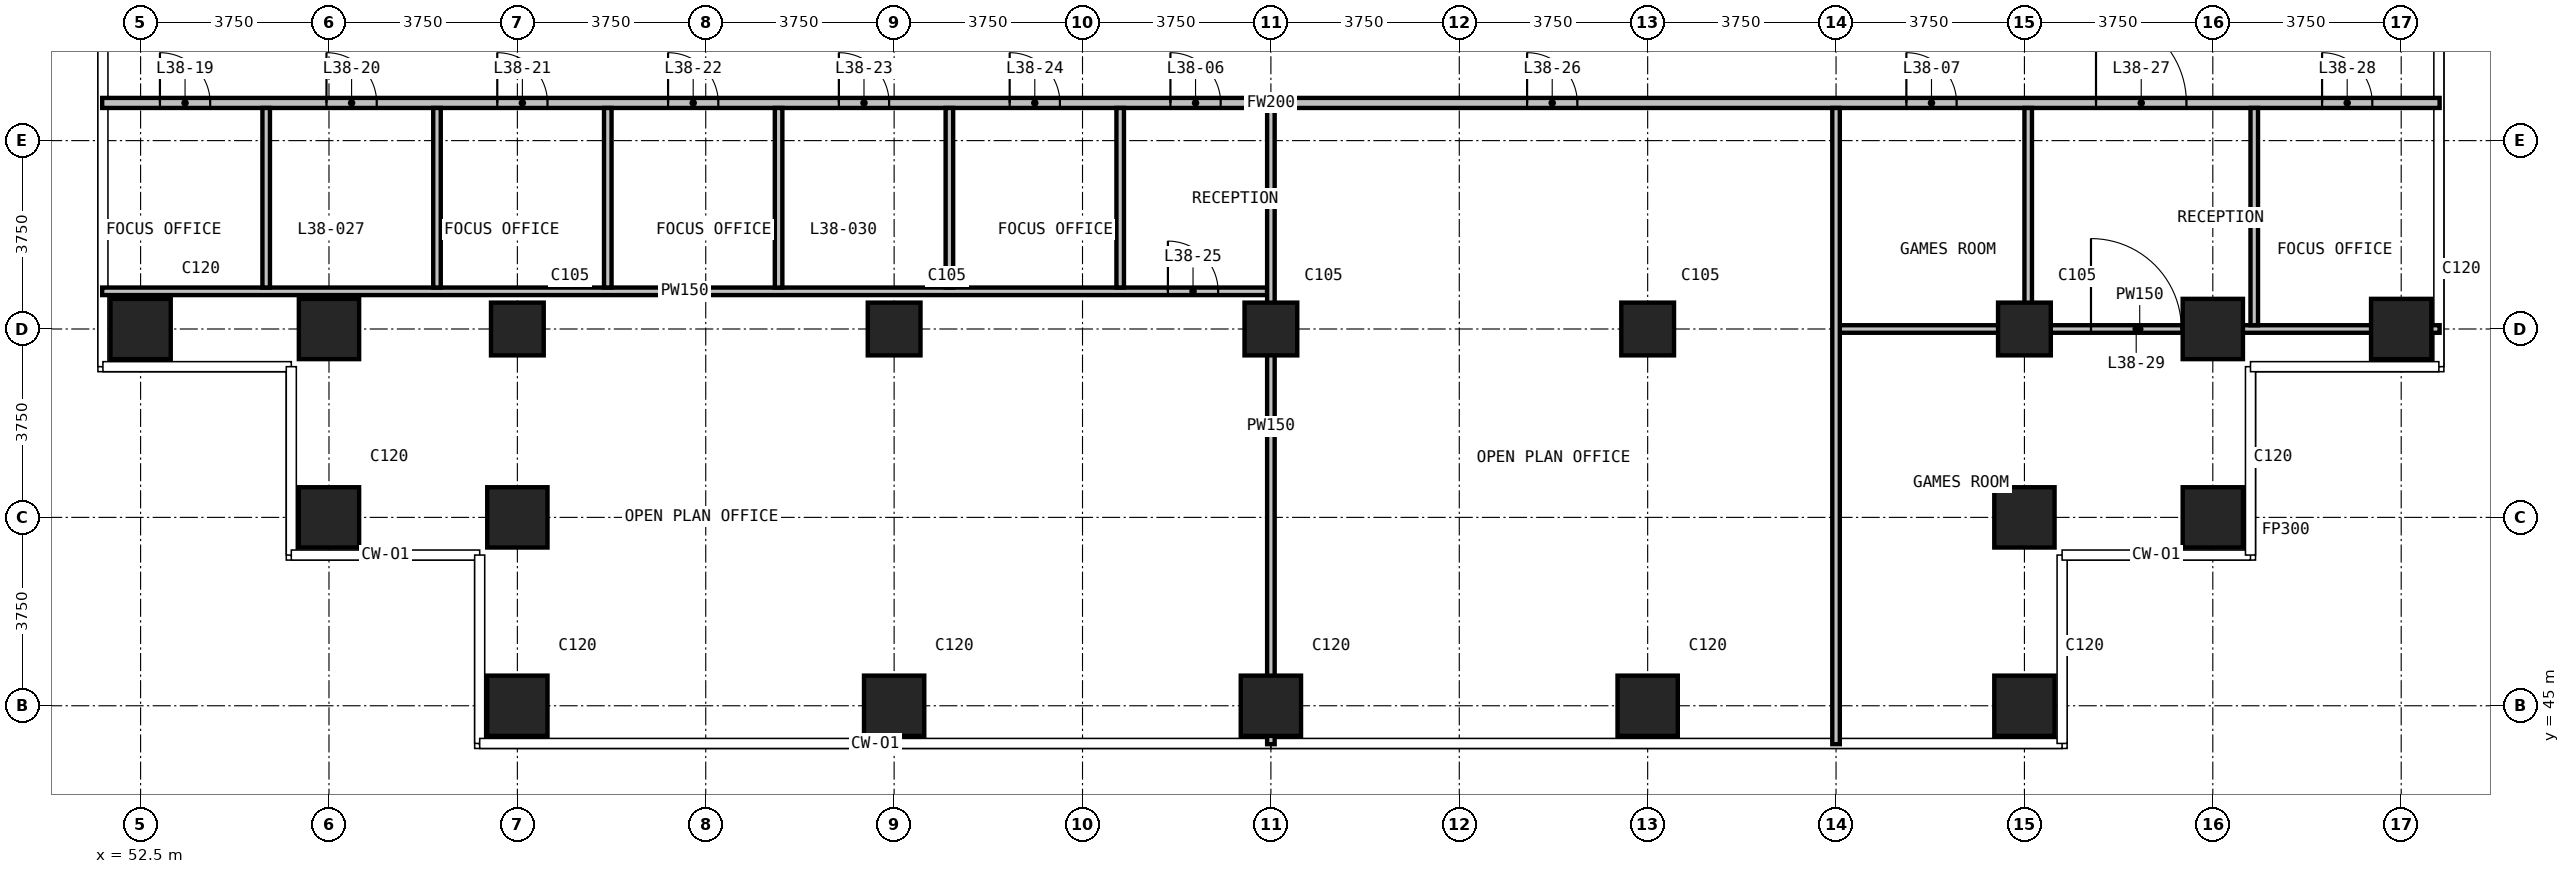
"""IFC4 building model, lengths in metres.
Left out: names, types, materials, properties, quantities, classifications, styles, units other than length and angle.
Written with IfcOpenShell. Run it as: python <this file> out.ifc"""

import sys

from ifc_helpers import new_model, si_unit, direction, frame, frame_2d, origin, origin_2d, place, context, subcontext, project, spatial, rectangle, extrude, element, fill, save


model = new_model("IFC4")
c1 = context("Model", 3, precision=1e-05, world=origin(), true_north=direction((0.0, 1.0)))
c2 = subcontext(c1, "Body", "Model", "MODEL_VIEW")
j1 = project(units=[si_unit("LENGTHUNIT", "METRE"), si_unit("PLANEANGLEUNIT", "RADIAN")], contexts=[c1])
p1 = place(None, origin())
s1 = spatial("IfcSite", under=j1, at=p1, CompositionType="ELEMENT")
p2 = place(p1, origin())
s2 = spatial("IfcBuilding", under=s1, at=p2, CompositionType="ELEMENT")
p3 = place(p2, frame((0.0, 0.0, 151.3)))
s3 = spatial("IfcBuildingStorey", under=s2, at=p3, CompositionType="ELEMENT", Elevation=151.3)
for number, where, z_axis, x_axis in (
    (1, (52.5, 52.5, 0.0), (0.0, 0.0, 1.0), (1.0, 0.0, 0.0)),
    (2, (56.25, 48.75, 0.0), (0.0, 0.0, 1.0), (1.0, 0.0, 0.0)),
    (3, (56.25, 52.5, 0.0), (0.0, 0.0, 1.0), (1.0, 0.0, 0.0)),
    (4, (60.0, 45.0, 0.0), (0.0, 0.0, 1.0), (1.0, 0.0, 0.0)),
    (5, (60.0, 48.75, 0.0), (0.0, 0.0, 1.0), (1.0, 0.0, 0.0)),
):
    element("IfcColumn", number, at=place(p3, frame(where, z_axis=z_axis, x_axis=x_axis)), inside=s3, PredefinedType="COLUMN", context=c2, shape_type="SweptSolid", body=[
        extrude(rectangle(XDim=1.2, YDim=1.2, at=origin_2d()), origin(), (0.0, 0.0, 1.0), 3.6),
    ])
p4 = place(p3, frame((60.0, 52.5, 0.0), z_axis=(0.0, 0.0, 1.0), x_axis=(1.0, 0.0, 0.0)))
e6 = element("IfcColumn", 6, at=p4, inside=s3, PredefinedType="COLUMN", context=c2, shape_type="SweptSolid", body=[
    extrude(rectangle(XDim=1.05, YDim=1.05, at=origin_2d()), origin(), (0.0, 0.0, 1.0), 3.6),
])
p5 = place(p3, frame((67.5, 45.0, 0.0), z_axis=(0.0, 0.0, 1.0), x_axis=(1.0, 0.0, 0.0)))
e7 = element("IfcColumn", 7, at=p5, inside=s3, PredefinedType="COLUMN", context=c2, shape_type="SweptSolid", body=[
    extrude(rectangle(XDim=1.2, YDim=1.2, at=origin_2d()), origin(), (0.0, 0.0, 1.0), 3.6),
])
p6 = place(p3, frame((67.5, 52.5, 0.0), z_axis=(0.0, 0.0, 1.0), x_axis=(1.0, 0.0, 0.0)))
e8 = element("IfcColumn", 8, at=p6, inside=s3, PredefinedType="COLUMN", context=c2, shape_type="SweptSolid", body=[
    extrude(rectangle(XDim=1.05, YDim=1.05, at=origin_2d()), origin(), (0.0, 0.0, 1.0), 3.6),
])
p7 = place(p3, frame((75.0, 45.0, 0.0), z_axis=(0.0, 0.0, 1.0), x_axis=(1.0, 0.0, 0.0)))
e9 = element("IfcColumn", 9, at=p7, inside=s3, PredefinedType="COLUMN", context=c2, shape_type="SweptSolid", body=[
    extrude(rectangle(XDim=1.2, YDim=1.2, at=origin_2d()), origin(), (0.0, 0.0, 1.0), 3.6),
])
p8 = place(p3, frame((75.0, 52.5, 0.0), z_axis=(0.0, 0.0, 1.0), x_axis=(1.0, 0.0, 0.0)))
e10 = element("IfcColumn", 10, at=p8, inside=s3, PredefinedType="COLUMN", context=c2, shape_type="SweptSolid", body=[
    extrude(rectangle(XDim=1.05, YDim=1.05, at=origin_2d()), origin(), (0.0, 0.0, 1.0), 3.6),
])
p9 = place(p3, frame((82.5, 45.0, 0.0), z_axis=(0.0, 0.0, 1.0), x_axis=(1.0, 0.0, 0.0)))
e11 = element("IfcColumn", 11, at=p9, inside=s3, PredefinedType="COLUMN", context=c2, shape_type="SweptSolid", body=[
    extrude(rectangle(XDim=1.2, YDim=1.2, at=origin_2d()), origin(), (0.0, 0.0, 1.0), 3.6),
])
p10 = place(p3, frame((82.5, 52.5, 0.0), z_axis=(0.0, 0.0, 1.0), x_axis=(1.0, 0.0, 0.0)))
e12 = element("IfcColumn", 12, at=p10, inside=s3, PredefinedType="COLUMN", context=c2, shape_type="SweptSolid", body=[
    extrude(rectangle(XDim=1.05, YDim=1.05, at=origin_2d()), origin(), (0.0, 0.0, 1.0), 3.6),
])
for number, where, z_axis, x_axis in (
    (13, (90.0, 45.0, 0.0), (0.0, 0.0, 1.0), (1.0, 0.0, 0.0)),
    (14, (90.0, 48.75, 0.0), (0.0, 0.0, 1.0), (1.0, 0.0, 0.0)),
):
    element("IfcColumn", number, at=place(p3, frame(where, z_axis=z_axis, x_axis=x_axis)), inside=s3, PredefinedType="COLUMN", context=c2, shape_type="SweptSolid", body=[
        extrude(rectangle(XDim=1.2, YDim=1.2, at=origin_2d()), origin(), (0.0, 0.0, 1.0), 3.6),
    ])
p11 = place(p3, frame((90.0, 52.5, 0.0), z_axis=(0.0, 0.0, 1.0), x_axis=(1.0, 0.0, 0.0)))
e15 = element("IfcColumn", 15, at=p11, inside=s3, PredefinedType="COLUMN", context=c2, shape_type="SweptSolid", body=[
    extrude(rectangle(XDim=1.05, YDim=1.05, at=origin_2d()), origin(), (0.0, 0.0, 1.0), 3.6),
])
for number, where, z_axis, x_axis in (
    (16, (93.75, 48.75, 0.0), (0.0, 0.0, 1.0), (1.0, 0.0, 0.0)),
    (17, (93.75, 52.5, 0.0), (0.0, 0.0, 1.0), (1.0, 0.0, 0.0)),
    (18, (97.5, 52.5, 0.0), (0.0, 0.0, 1.0), (1.0, 0.0, 0.0)),
):
    element("IfcColumn", number, at=place(p3, frame(where, z_axis=z_axis, x_axis=x_axis)), inside=s3, PredefinedType="COLUMN", context=c2, shape_type="SweptSolid", body=[
        extrude(rectangle(XDim=1.2, YDim=1.2, at=origin_2d()), origin(), (0.0, 0.0, 1.0), 3.6),
    ])
p12 = place(p3, frame((51.735, 57.0, 0.0), z_axis=(0.0, 0.0, 1.0), x_axis=(1.0, 0.0, 0.0)))
e19 = element("IfcWall", 19, at=p12, inside=s3, PredefinedType="PARTITIONING", context=c2, shape_type="SweptSolid", body=[
    extrude(rectangle(XDim=46.53, YDim=0.2, at=frame_2d((23.265, 0.0))), origin(), (0.0, 0.0, 1.0), 3.3),
])
p13 = place(p12, frame((21.265, 0.0, 0.0)))
e20 = element("IfcOpeningElement", 20, at=p13, cuts=e19, PredefinedType="OPENING", context=c2, shape_type="SweptSolid", body=[
    extrude(rectangle(XDim=1.0, YDim=2.2, at=frame_2d((0.5, 1.1))), frame((0.0, 0.11, 0.0), z_axis=(0.0, -1.0, 0.0), x_axis=(1.0, 0.0, 0.0)), (0.0, 0.0, 1.0), 0.22),
])
p14 = place(p12, frame((35.915, 0.0, 0.0)))
e21 = element("IfcOpeningElement", 21, at=p14, cuts=e19, PredefinedType="OPENING", context=c2, shape_type="SweptSolid", body=[
    extrude(rectangle(XDim=1.0, YDim=2.2, at=frame_2d((0.5, 1.1))), frame((0.0, 0.11, 0.0), z_axis=(0.0, -1.0, 0.0), x_axis=(1.0, 0.0, 0.0)), (0.0, 0.0, 1.0), 0.22),
])
p15 = place(p12, frame((1.15, 0.0, 0.0)))
e22 = element("IfcOpeningElement", 22, at=p15, cuts=e19, PredefinedType="OPENING", context=c2, shape_type="SweptSolid", body=[
    extrude(rectangle(XDim=1.0, YDim=2.2, at=frame_2d((0.5, 1.1))), frame((0.0, 0.11, 0.0), z_axis=(0.0, -1.0, 0.0), x_axis=(1.0, 0.0, 0.0)), (0.0, 0.0, 1.0), 0.22),
])
p16 = place(p12, frame((4.465, 0.0, 0.0)))
e23 = element("IfcOpeningElement", 23, at=p16, cuts=e19, PredefinedType="OPENING", context=c2, shape_type="SweptSolid", body=[
    extrude(rectangle(XDim=1.0, YDim=2.2, at=frame_2d((0.5, 1.1))), frame((0.0, 0.11, 0.0), z_axis=(0.0, -1.0, 0.0), x_axis=(1.0, 0.0, 0.0)), (0.0, 0.0, 1.0), 0.22),
])
p17 = place(p12, frame((7.865, 0.0, 0.0)))
e24 = element("IfcOpeningElement", 24, at=p17, cuts=e19, PredefinedType="OPENING", context=c2, shape_type="SweptSolid", body=[
    extrude(rectangle(XDim=1.0, YDim=2.2, at=frame_2d((0.5, 1.1))), frame((0.0, 0.11, 0.0), z_axis=(0.0, -1.0, 0.0), x_axis=(1.0, 0.0, 0.0)), (0.0, 0.0, 1.0), 0.22),
])
p18 = place(p12, frame((11.265, 0.0, 0.0)))
e25 = element("IfcOpeningElement", 25, at=p18, cuts=e19, PredefinedType="OPENING", context=c2, shape_type="SweptSolid", body=[
    extrude(rectangle(XDim=1.0, YDim=2.2, at=frame_2d((0.5, 1.1))), frame((0.0, 0.11, 0.0), z_axis=(0.0, -1.0, 0.0), x_axis=(1.0, 0.0, 0.0)), (0.0, 0.0, 1.0), 0.22),
])
p19 = place(p12, frame((14.665, 0.0, 0.0)))
e26 = element("IfcOpeningElement", 26, at=p19, cuts=e19, PredefinedType="OPENING", context=c2, shape_type="SweptSolid", body=[
    extrude(rectangle(XDim=1.0, YDim=2.2, at=frame_2d((0.5, 1.1))), frame((0.0, 0.11, 0.0), z_axis=(0.0, -1.0, 0.0), x_axis=(1.0, 0.0, 0.0)), (0.0, 0.0, 1.0), 0.22),
])
p20 = place(p12, frame((18.065, 0.0, 0.0)))
e27 = element("IfcOpeningElement", 27, at=p20, cuts=e19, PredefinedType="OPENING", context=c2, shape_type="SweptSolid", body=[
    extrude(rectangle(XDim=1.0, YDim=2.2, at=frame_2d((0.5, 1.1))), frame((0.0, 0.11, 0.0), z_axis=(0.0, -1.0, 0.0), x_axis=(1.0, 0.0, 0.0)), (0.0, 0.0, 1.0), 0.22),
])
p21 = place(p12, frame((28.365, 0.0, 0.0)))
e28 = element("IfcOpeningElement", 28, at=p21, cuts=e19, PredefinedType="OPENING", context=c2, shape_type="SweptSolid", body=[
    extrude(rectangle(XDim=1.0, YDim=2.2, at=frame_2d((0.5, 1.1))), frame((0.0, 0.11, 0.0), z_axis=(0.0, -1.0, 0.0), x_axis=(1.0, 0.0, 0.0)), (0.0, 0.0, 1.0), 0.22),
])
p22 = place(p12, frame((39.69, 0.0, 0.0)))
e29 = element("IfcOpeningElement", 29, at=p22, cuts=e19, PredefinedType="OPENING", context=c2, shape_type="SweptSolid", body=[
    extrude(rectangle(XDim=1.8, YDim=2.2, at=frame_2d((0.9, 1.1))), frame((0.0, 0.11, 0.0), z_axis=(0.0, -1.0, 0.0), x_axis=(1.0, 0.0, 0.0)), (0.0, 0.0, 1.0), 0.22),
])
p23 = place(p12, frame((44.19, 0.0, 0.0)))
e30 = element("IfcOpeningElement", 30, at=p23, cuts=e19, PredefinedType="OPENING", context=c2, shape_type="SweptSolid", body=[
    extrude(rectangle(XDim=1.0, YDim=2.2, at=frame_2d((0.5, 1.1))), frame((0.0, 0.11, 0.0), z_axis=(0.0, -1.0, 0.0), x_axis=(1.0, 0.0, 0.0)), (0.0, 0.0, 1.0), 0.22),
])
p24 = place(p3, frame((86.325, 52.5, 0.0), z_axis=(0.0, 0.0, 1.0), x_axis=(1.0, 0.0, 0.0)))
e31 = element("IfcWall", 31, at=p24, inside=s3, PredefinedType="PARTITIONING", context=c2, shape_type="SweptSolid", body=[
    extrude(rectangle(XDim=11.94, YDim=0.15, at=frame_2d((5.97, 0.0))), origin(), (0.0, 0.0, 1.0), 3.3),
])
p25 = place(p24, frame((5.0, 0.0, 0.0)))
e32 = element("IfcOpeningElement", 32, at=p25, cuts=e31, PredefinedType="OPENING", context=c2, shape_type="SweptSolid", body=[
    extrude(rectangle(XDim=1.8, YDim=2.2, at=frame_2d((0.9, 1.1))), frame((0.0, 0.085, 0.0), z_axis=(0.0, -1.0, 0.0), x_axis=(1.0, 0.0, 0.0)), (0.0, 0.0, 1.0), 0.17),
])
p26 = place(p3, frame((51.735, 53.25, 0.0), z_axis=(0.0, 0.0, 1.0), x_axis=(1.0, 0.0, 0.0)))
e33 = element("IfcWall", 33, at=p26, inside=s3, PredefinedType="PARTITIONING", context=c2, shape_type="SweptSolid", body=[
    extrude(rectangle(XDim=23.19, YDim=0.15, at=frame_2d((11.595, 0.0))), origin(), (0.0, 0.0, 1.0), 3.3),
])
p27 = place(p26, frame((21.215, 0.0, 0.0)))
e34 = element("IfcOpeningElement", 34, at=p27, cuts=e33, PredefinedType="OPENING", context=c2, shape_type="SweptSolid", body=[
    extrude(rectangle(XDim=1.0, YDim=2.2, at=frame_2d((0.5, 1.1))), frame((0.0, 0.085, 0.0), z_axis=(0.0, -1.0, 0.0), x_axis=(1.0, 0.0, 0.0)), (0.0, 0.0, 1.0), 0.17),
])
for number, where, z_axis, x_axis in (
    (35, (55.0, 53.325, 0.0), (0.0, 0.0, 1.0), (0.0, 1.0, 0.0)),
    (36, (58.4, 53.325, 0.0), (0.0, 0.0, 1.0), (0.0, 1.0, 0.0)),
    (37, (61.8, 53.325, 0.0), (0.0, 0.0, 1.0), (0.0, 1.0, 0.0)),
    (38, (65.2, 53.325, 0.0), (0.0, 0.0, 1.0), (0.0, 1.0, 0.0)),
    (39, (68.6, 53.325, 0.0), (0.0, 0.0, 1.0), (0.0, 1.0, 0.0)),
    (40, (72.0, 53.325, 0.0), (0.0, 0.0, 1.0), (0.0, 1.0, 0.0)),
):
    element("IfcWall", number, at=place(p3, frame(where, z_axis=z_axis, x_axis=x_axis)), inside=s3, PredefinedType="PARTITIONING", context=c2, shape_type="SweptSolid", body=[
        extrude(rectangle(XDim=3.575, YDim=0.15, at=frame_2d((1.788, 0.0))), origin(), (0.0, 0.0, 1.0), 3.3),
    ])
for number, where, z_axis, x_axis in (
    (41, (75.0, 44.235, 0.0), (0.0, 0.0, 1.0), (0.0, 1.0, 0.0)),
    (42, (86.25, 44.235, 0.0), (0.0, 0.0, 1.0), (0.0, 1.0, 0.0)),
):
    element("IfcWall", number, at=place(p3, frame(where, z_axis=z_axis, x_axis=x_axis)), inside=s3, PredefinedType="PARTITIONING", context=c2, shape_type="SweptSolid", body=[
        extrude(rectangle(XDim=12.665, YDim=0.15, at=frame_2d((6.333, 0.0))), origin(), (0.0, 0.0, 1.0), 3.3),
    ])
for number, where, z_axis, x_axis in (
    (43, (90.075, 52.575, 0.0), (0.0, 0.0, 1.0), (0.0, 1.0, 0.0)),
    (44, (94.575, 52.575, 0.0), (0.0, 0.0, 1.0), (0.0, 1.0, 0.0)),
):
    element("IfcWall", number, at=place(p3, frame(where, z_axis=z_axis, x_axis=x_axis)), inside=s3, PredefinedType="PARTITIONING", context=c2, shape_type="SweptSolid", body=[
        extrude(rectangle(XDim=4.325, YDim=0.15, at=frame_2d((2.163, 0.0))), origin(), (0.0, 0.0, 1.0), 3.3),
    ])
p28 = place(p13, origin())
e45 = element("IfcDoor", 45, at=p28, inside=s3, OperationType="SINGLE_SWING_RIGHT", PredefinedType="DOOR", context=c2, shape_type="SweptSolid", body=[
    extrude(rectangle(XDim=1.0, YDim=2.2, at=frame_2d((0.5, 1.1))), frame((0.0, 0.025, 0.0), z_axis=(0.0, -1.0, 0.0), x_axis=(1.0, 0.0, 0.0)), (0.0, 0.0, 1.0), 0.05),
])
fill(e20, e45)
p29 = place(p14, origin())
e46 = element("IfcDoor", 46, at=p29, inside=s3, OperationType="SINGLE_SWING_RIGHT", PredefinedType="DOOR", context=c2, shape_type="SweptSolid", body=[
    extrude(rectangle(XDim=1.0, YDim=2.2, at=frame_2d((0.5, 1.1))), frame((0.0, 0.025, 0.0), z_axis=(0.0, -1.0, 0.0), x_axis=(1.0, 0.0, 0.0)), (0.0, 0.0, 1.0), 0.05),
])
fill(e21, e46)
p30 = place(p15, origin())
e47 = element("IfcDoor", 47, at=p30, inside=s3, OperationType="SINGLE_SWING_LEFT", PredefinedType="DOOR", context=c2, shape_type="SweptSolid", body=[
    extrude(rectangle(XDim=1.0, YDim=2.2, at=frame_2d((0.5, 1.1))), frame((0.0, 0.025, 0.0), z_axis=(0.0, -1.0, 0.0), x_axis=(1.0, 0.0, 0.0)), (0.0, 0.0, 1.0), 0.05),
])
fill(e22, e47)
p31 = place(p16, origin())
e48 = element("IfcDoor", 48, at=p31, inside=s3, OperationType="SINGLE_SWING_LEFT", PredefinedType="DOOR", context=c2, shape_type="SweptSolid", body=[
    extrude(rectangle(XDim=1.0, YDim=2.2, at=frame_2d((0.5, 1.1))), frame((0.0, 0.025, 0.0), z_axis=(0.0, -1.0, 0.0), x_axis=(1.0, 0.0, 0.0)), (0.0, 0.0, 1.0), 0.05),
])
fill(e23, e48)
p32 = place(p17, origin())
e49 = element("IfcDoor", 49, at=p32, inside=s3, OperationType="SINGLE_SWING_LEFT", PredefinedType="DOOR", context=c2, shape_type="SweptSolid", body=[
    extrude(rectangle(XDim=1.0, YDim=2.2, at=frame_2d((0.5, 1.1))), frame((0.0, 0.025, 0.0), z_axis=(0.0, -1.0, 0.0), x_axis=(1.0, 0.0, 0.0)), (0.0, 0.0, 1.0), 0.05),
])
fill(e24, e49)
p33 = place(p18, origin())
e50 = element("IfcDoor", 50, at=p33, inside=s3, OperationType="SINGLE_SWING_LEFT", PredefinedType="DOOR", context=c2, shape_type="SweptSolid", body=[
    extrude(rectangle(XDim=1.0, YDim=2.2, at=frame_2d((0.5, 1.1))), frame((0.0, 0.025, 0.0), z_axis=(0.0, -1.0, 0.0), x_axis=(1.0, 0.0, 0.0)), (0.0, 0.0, 1.0), 0.05),
])
fill(e25, e50)
p34 = place(p19, origin())
e51 = element("IfcDoor", 51, at=p34, inside=s3, OperationType="SINGLE_SWING_RIGHT", PredefinedType="DOOR", context=c2, shape_type="SweptSolid", body=[
    extrude(rectangle(XDim=1.0, YDim=2.2, at=frame_2d((0.5, 1.1))), frame((0.0, 0.025, 0.0), z_axis=(0.0, -1.0, 0.0), x_axis=(1.0, 0.0, 0.0)), (0.0, 0.0, 1.0), 0.05),
])
fill(e26, e51)
p35 = place(p20, origin())
e52 = element("IfcDoor", 52, at=p35, inside=s3, OperationType="SINGLE_SWING_RIGHT", PredefinedType="DOOR", context=c2, shape_type="SweptSolid", body=[
    extrude(rectangle(XDim=1.0, YDim=2.2, at=frame_2d((0.5, 1.1))), frame((0.0, 0.025, 0.0), z_axis=(0.0, -1.0, 0.0), x_axis=(1.0, 0.0, 0.0)), (0.0, 0.0, 1.0), 0.05),
])
fill(e27, e52)
p36 = place(p27, origin())
e53 = element("IfcDoor", 53, at=p36, inside=s3, OperationType="SINGLE_SWING_LEFT", PredefinedType="DOOR", context=c2, shape_type="SweptSolid", body=[
    extrude(rectangle(XDim=1.0, YDim=2.2, at=frame_2d((0.5, 1.1))), frame((0.0, 0.025, 0.0), z_axis=(0.0, -1.0, 0.0), x_axis=(1.0, 0.0, 0.0)), (0.0, 0.0, 1.0), 0.05),
])
fill(e34, e53)
p37 = place(p21, origin())
e54 = element("IfcDoor", 54, at=p37, inside=s3, OperationType="SINGLE_SWING_RIGHT", PredefinedType="DOOR", context=c2, shape_type="SweptSolid", body=[
    extrude(rectangle(XDim=1.0, YDim=2.2, at=frame_2d((0.5, 1.1))), frame((0.0, 0.025, 0.0), z_axis=(0.0, -1.0, 0.0), x_axis=(1.0, 0.0, 0.0)), (0.0, 0.0, 1.0), 0.05),
])
fill(e28, e54)
p38 = place(p22, origin())
e55 = element("IfcDoor", 55, at=p38, inside=s3, OperationType="DOUBLE_DOOR_SINGLE_SWING", PredefinedType="DOOR", context=c2, shape_type="SweptSolid", body=[
    extrude(rectangle(XDim=1.8, YDim=2.2, at=frame_2d((0.9, 1.1))), frame((0.0, 0.025, 0.0), z_axis=(0.0, -1.0, 0.0), x_axis=(1.0, 0.0, 0.0)), (0.0, 0.0, 1.0), 0.05),
])
fill(e29, e55)
p39 = place(p23, origin())
e56 = element("IfcDoor", 56, at=p39, inside=s3, OperationType="SINGLE_SWING_LEFT", PredefinedType="DOOR", context=c2, shape_type="SweptSolid", body=[
    extrude(rectangle(XDim=1.0, YDim=2.2, at=frame_2d((0.5, 1.1))), frame((0.0, 0.025, 0.0), z_axis=(0.0, -1.0, 0.0), x_axis=(1.0, 0.0, 0.0)), (0.0, 0.0, 1.0), 0.05),
])
fill(e30, e56)
p40 = place(p25, origin())
e57 = element("IfcDoor", 57, at=p40, inside=s3, OperationType="DOUBLE_DOOR_SINGLE_SWING", PredefinedType="DOOR", context=c2, shape_type="SweptSolid", body=[
    extrude(rectangle(XDim=1.8, YDim=2.2, at=frame_2d((0.9, 1.1))), frame((0.0, 0.025, 0.0), z_axis=(0.0, -1.0, 0.0), x_axis=(1.0, 0.0, 0.0)), (0.0, 0.0, 1.0), 0.05),
])
fill(e32, e57)
save(model, sys.argv[1])
